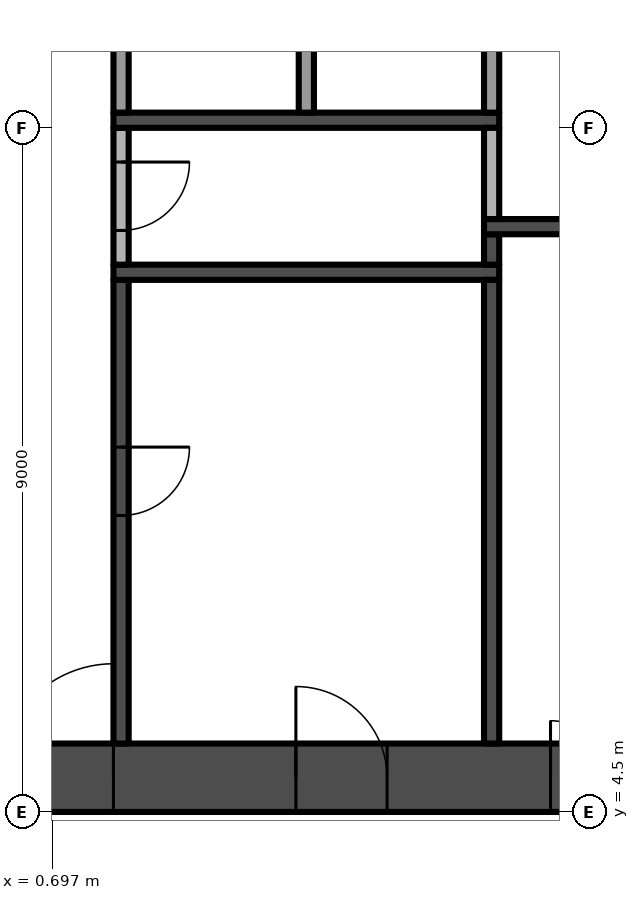
"""IFC4 building model, lengths in metres.
Left out: names, types, materials, properties, quantities, classifications, styles, units other than length and angle.
Written with IfcOpenShell. Run it as: python <this file> out.ifc"""

import sys

from ifc_helpers import new_model, si_unit, direction, frame, frame_2d, origin, place, context, subcontext, project, spatial, rectangle, extrude, element, fill, save


model = new_model("IFC4")
c1 = context("Model", 3, precision=1e-05, world=origin(), true_north=direction((0.0, 1.0)))
c2 = subcontext(c1, "Body", "Model", "MODEL_VIEW")
j1 = project(units=[si_unit("LENGTHUNIT", "METRE"), si_unit("PLANEANGLEUNIT", "RADIAN")], contexts=[c1])
p1 = place(None, origin())
s1 = spatial("IfcSite", under=j1, at=p1, CompositionType="ELEMENT")
p2 = place(p1, origin())
s2 = spatial("IfcBuilding", under=s1, at=p2, CompositionType="ELEMENT")
p3 = place(p2, frame((0.0, 0.0, 69.4)))
s3 = spatial("IfcBuildingStorey", under=s2, at=p3, CompositionType="ELEMENT", Elevation=69.4)
p4 = place(p3, frame((-13.5, 4.95, -0.3), z_axis=(0.0, 0.0, 1.0), x_axis=(1.0, 0.0, 0.0)))
e1 = element("IfcWall", 1, at=p4, inside=s3, PredefinedType="SHEAR", context=c2, shape_type="SweptSolid", body=[
    extrude(rectangle(XDim=27.0, YDim=0.9, at=frame_2d((13.5, 0.0))), origin(), (0.0, 0.0, 1.0), 3.8),
])
p5 = place(p4, frame((12.0, 0.0, 0.3)))
e2 = element("IfcOpeningElement", 2, at=p5, cuts=e1, PredefinedType="OPENING", context=c2, shape_type="SweptSolid", body=[
    extrude(rectangle(XDim=3.0, YDim=2.4, at=frame_2d((1.5, 1.2))), frame((0.0, 0.46, 0.0), z_axis=(0.0, -1.0, 0.0), x_axis=(1.0, 0.0, 0.0)), (0.0, 0.0, 1.0), 0.92),
])
p6 = place(p4, frame((4.9, 0.0, 0.3)))
e3 = element("IfcOpeningElement", 3, at=p6, cuts=e1, PredefinedType="OPENING", context=c2, shape_type="SweptSolid", body=[
    extrude(rectangle(XDim=1.2, YDim=2.2, at=frame_2d((0.6, 1.1))), frame((0.0, 0.46, 0.0), z_axis=(0.0, -1.0, 0.0), x_axis=(1.0, 0.0, 0.0)), (0.0, 0.0, 1.0), 0.92),
])
p7 = place(p4, frame((20.75, 0.0, 0.3)))
e4 = element("IfcOpeningElement", 4, at=p7, cuts=e1, PredefinedType="OPENING", context=c2, shape_type="SweptSolid", body=[
    extrude(rectangle(XDim=1.5, YDim=2.2, at=frame_2d((0.75, 1.1))), frame((0.0, 0.46, 0.0), z_axis=(0.0, -1.0, 0.0), x_axis=(1.0, 0.0, 0.0)), (0.0, 0.0, 1.0), 0.92),
])
p8 = place(p4, frame((17.4, 0.0, 0.3)))
e5 = element("IfcOpeningElement", 5, at=p8, cuts=e1, PredefinedType="OPENING", context=c2, shape_type="SweptSolid", body=[
    extrude(rectangle(XDim=1.2, YDim=2.2, at=frame_2d((0.6, 1.1))), frame((0.0, 0.46, 0.0), z_axis=(0.0, -1.0, 0.0), x_axis=(1.0, 0.0, 0.0)), (0.0, 0.0, 1.0), 0.92),
])
p9 = place(p3, frame((1.6, 11.5, 0.0), z_axis=(0.0, 0.0, 1.0), x_axis=(0.0, -1.0, 0.0)))
e6 = element("IfcWall", 6, at=p9, inside=s3, PredefinedType="SHEAR", context=c2, shape_type="SweptSolid", body=[
    extrude(rectangle(XDim=6.1, YDim=0.2, at=frame_2d((3.05, 0.0))), origin(), (0.0, 0.0, 1.0), 3.5),
])
p10 = place(p9, frame((2.2, 0.0, 0.0)))
e7 = element("IfcOpeningElement", 7, at=p10, cuts=e6, PredefinedType="OPENING", context=c2, shape_type="SweptSolid", body=[
    extrude(rectangle(XDim=0.9, YDim=2.1, at=frame_2d((0.45, 1.05))), frame((0.0, 0.11, 0.0), z_axis=(0.0, -1.0, 0.0), x_axis=(1.0, 0.0, 0.0)), (0.0, 0.0, 1.0), 0.22),
])
p11 = place(p3, frame((1.5, 11.6, 0.0), z_axis=(0.0, 0.0, 1.0), x_axis=(1.0, 0.0, 0.0)))
e8 = element("IfcWall", 8, at=p11, inside=s3, PredefinedType="SHEAR", context=c2, shape_type="SweptSolid", body=[
    extrude(rectangle(XDim=5.075, YDim=0.2, at=frame_2d((2.538, 0.0))), origin(), (0.0, 0.0, 1.0), 3.5),
])
p12 = place(p3, frame((1.6, 13.5, 0.0), z_axis=(0.0, 0.0, 1.0), x_axis=(0.0, -1.0, 0.0)))
e9 = element("IfcWall", 9, at=p12, inside=s3, PredefinedType="PARTITIONING", context=c2, shape_type="SweptSolid", body=[
    extrude(rectangle(XDim=1.8, YDim=0.2, at=frame_2d((0.9, 0.0))), origin(), (0.0, 0.0, 1.0), 3.5),
])
p13 = place(p12, frame((0.45, 0.0, 0.0)))
e10 = element("IfcOpeningElement", 10, at=p13, cuts=e9, PredefinedType="OPENING", context=c2, shape_type="SweptSolid", body=[
    extrude(rectangle(XDim=0.9, YDim=2.1, at=frame_2d((0.45, 1.05))), frame((0.0, 0.11, 0.0), z_axis=(0.0, -1.0, 0.0), x_axis=(1.0, 0.0, 0.0)), (0.0, 0.0, 1.0), 0.22),
])
p14 = place(p3, frame((1.5, 13.6, 0.0), z_axis=(0.0, 0.0, 1.0), x_axis=(1.0, 0.0, 0.0)))
e11 = element("IfcWall", 11, at=p14, inside=s3, PredefinedType="SHEAR", context=c2, shape_type="SweptSolid", body=[
    extrude(rectangle(XDim=5.075, YDim=0.2, at=frame_2d((2.538, 0.0))), origin(), (0.0, 0.0, 1.0), 3.5),
])
for number, where, z_axis, x_axis in (
    (12, (1.6, 13.7, 0.0), (0.0, 0.0, 1.0), (0.0, 1.0, 0.0)),
    (13, (4.037, 13.7, 0.0), (0.0, 0.0, 1.0), (0.0, 1.0, 0.0)),
):
    element("IfcWall", number, at=place(p3, frame(where, z_axis=z_axis, x_axis=x_axis)), inside=s3, PredefinedType="PARTITIONING", context=c2, shape_type="SweptSolid", body=[
        extrude(rectangle(XDim=2.2, YDim=0.2, at=frame_2d((1.1, 0.0))), origin(), (0.0, 0.0, 1.0), 3.5),
    ])
p15 = place(p3, frame((6.475, 5.4, 0.0), z_axis=(0.0, 0.0, 1.0), x_axis=(0.0, 1.0, 0.0)))
e14 = element("IfcWall", 14, at=p15, inside=s3, PredefinedType="SHEAR", context=c2, shape_type="SweptSolid", body=[
    extrude(rectangle(XDim=6.1, YDim=0.2, at=frame_2d((3.05, 0.0))), origin(), (0.0, 0.0, 1.0), 3.5),
])
p16 = place(p3, frame((6.475, 11.7, 0.0), z_axis=(0.0, 0.0, 1.0), x_axis=(0.0, 1.0, 0.0)))
e15 = element("IfcWall", 15, at=p16, inside=s3, PredefinedType="SHEAR", context=c2, shape_type="SweptSolid", body=[
    extrude(rectangle(XDim=0.4, YDim=0.2, at=frame_2d((0.2, 0.0))), origin(), (0.0, 0.0, 1.0), 3.5),
])
p17 = place(p3, frame((6.375, 12.2, 0.0), z_axis=(0.0, 0.0, 1.0), x_axis=(1.0, 0.0, 0.0)))
e16 = element("IfcWall", 16, at=p17, inside=s3, PredefinedType="SHEAR", context=c2, shape_type="SweptSolid", body=[
    extrude(rectangle(XDim=3.475, YDim=0.2, at=frame_2d((1.738, 0.0))), origin(), (0.0, 0.0, 1.0), 3.5),
])
p18 = place(p3, frame((6.475, 12.3, 0.0), z_axis=(0.0, 0.0, 1.0), x_axis=(0.0, 1.0, 0.0)))
e17 = element("IfcWall", 17, at=p18, inside=s3, PredefinedType="PARTITIONING", context=c2, shape_type="SweptSolid", body=[
    extrude(rectangle(XDim=1.2, YDim=0.2, at=frame_2d((0.6, 0.0))), origin(), (0.0, 0.0, 1.0), 3.5),
])
p19 = place(p3, frame((6.475, 13.7, 0.0), z_axis=(0.0, 0.0, 1.0), x_axis=(0.0, 1.0, 0.0)))
e18 = element("IfcWall", 18, at=p19, inside=s3, PredefinedType="PARTITIONING", context=c2, shape_type="SweptSolid", body=[
    extrude(rectangle(XDim=2.2, YDim=0.2, at=frame_2d((1.1, 0.0))), origin(), (0.0, 0.0, 1.0), 3.5),
])
p20 = place(p5, frame((3.0, 0.0, 0.0), z_axis=(0.0, 0.0, 1.0), x_axis=(-1.0, 0.0, 0.0)))
e19 = element("IfcDoor", 19, at=p20, inside=s3, OperationType="DOUBLE_DOOR_SINGLE_SWING", PredefinedType="DOOR", context=c2, shape_type="SweptSolid", body=[
    extrude(rectangle(XDim=3.0, YDim=2.4, at=frame_2d((1.5, 1.2))), frame((0.0, 0.025, 0.0), z_axis=(0.0, -1.0, 0.0), x_axis=(1.0, 0.0, 0.0)), (0.0, 0.0, 1.0), 0.05),
])
fill(e2, e19)
p21 = place(p7, frame((1.5, 0.0, 0.0), z_axis=(0.0, 0.0, 1.0), x_axis=(-1.0, 0.0, 0.0)))
e20 = element("IfcDoor", 20, at=p21, inside=s3, OperationType="DOUBLE_DOOR_SINGLE_SWING", PredefinedType="DOOR", context=c2, shape_type="SweptSolid", body=[
    extrude(rectangle(XDim=1.5, YDim=2.2, at=frame_2d((0.75, 1.1))), frame((0.0, 0.025, 0.0), z_axis=(0.0, -1.0, 0.0), x_axis=(1.0, 0.0, 0.0)), (0.0, 0.0, 1.0), 0.05),
])
fill(e4, e20)
p22 = place(p8, frame((1.2, 0.0, 0.0), z_axis=(0.0, 0.0, 1.0), x_axis=(-1.0, 0.0, 0.0)))
e21 = element("IfcDoor", 21, at=p22, inside=s3, OperationType="SINGLE_SWING_RIGHT", PredefinedType="DOOR", context=c2, shape_type="SweptSolid", body=[
    extrude(rectangle(XDim=1.2, YDim=2.2, at=frame_2d((0.6, 1.1))), frame((0.0, 0.025, 0.0), z_axis=(0.0, -1.0, 0.0), x_axis=(1.0, 0.0, 0.0)), (0.0, 0.0, 1.0), 0.05),
])
fill(e5, e21)
p23 = place(p10, origin())
e22 = element("IfcDoor", 22, at=p23, inside=s3, OperationType="SINGLE_SWING_LEFT", PredefinedType="DOOR", context=c2, shape_type="SweptSolid", body=[
    extrude(rectangle(XDim=0.9, YDim=2.1, at=frame_2d((0.45, 1.05))), frame((0.0, 0.025, 0.0), z_axis=(0.0, -1.0, 0.0), x_axis=(1.0, 0.0, 0.0)), (0.0, 0.0, 1.0), 0.05),
])
fill(e7, e22)
p24 = place(p13, origin())
e23 = element("IfcDoor", 23, at=p24, inside=s3, OperationType="SINGLE_SWING_LEFT", PredefinedType="DOOR", context=c2, shape_type="SweptSolid", body=[
    extrude(rectangle(XDim=0.9, YDim=2.1, at=frame_2d((0.45, 1.05))), frame((0.0, 0.025, 0.0), z_axis=(0.0, -1.0, 0.0), x_axis=(1.0, 0.0, 0.0)), (0.0, 0.0, 1.0), 0.05),
])
fill(e10, e23)
save(model, sys.argv[1])
